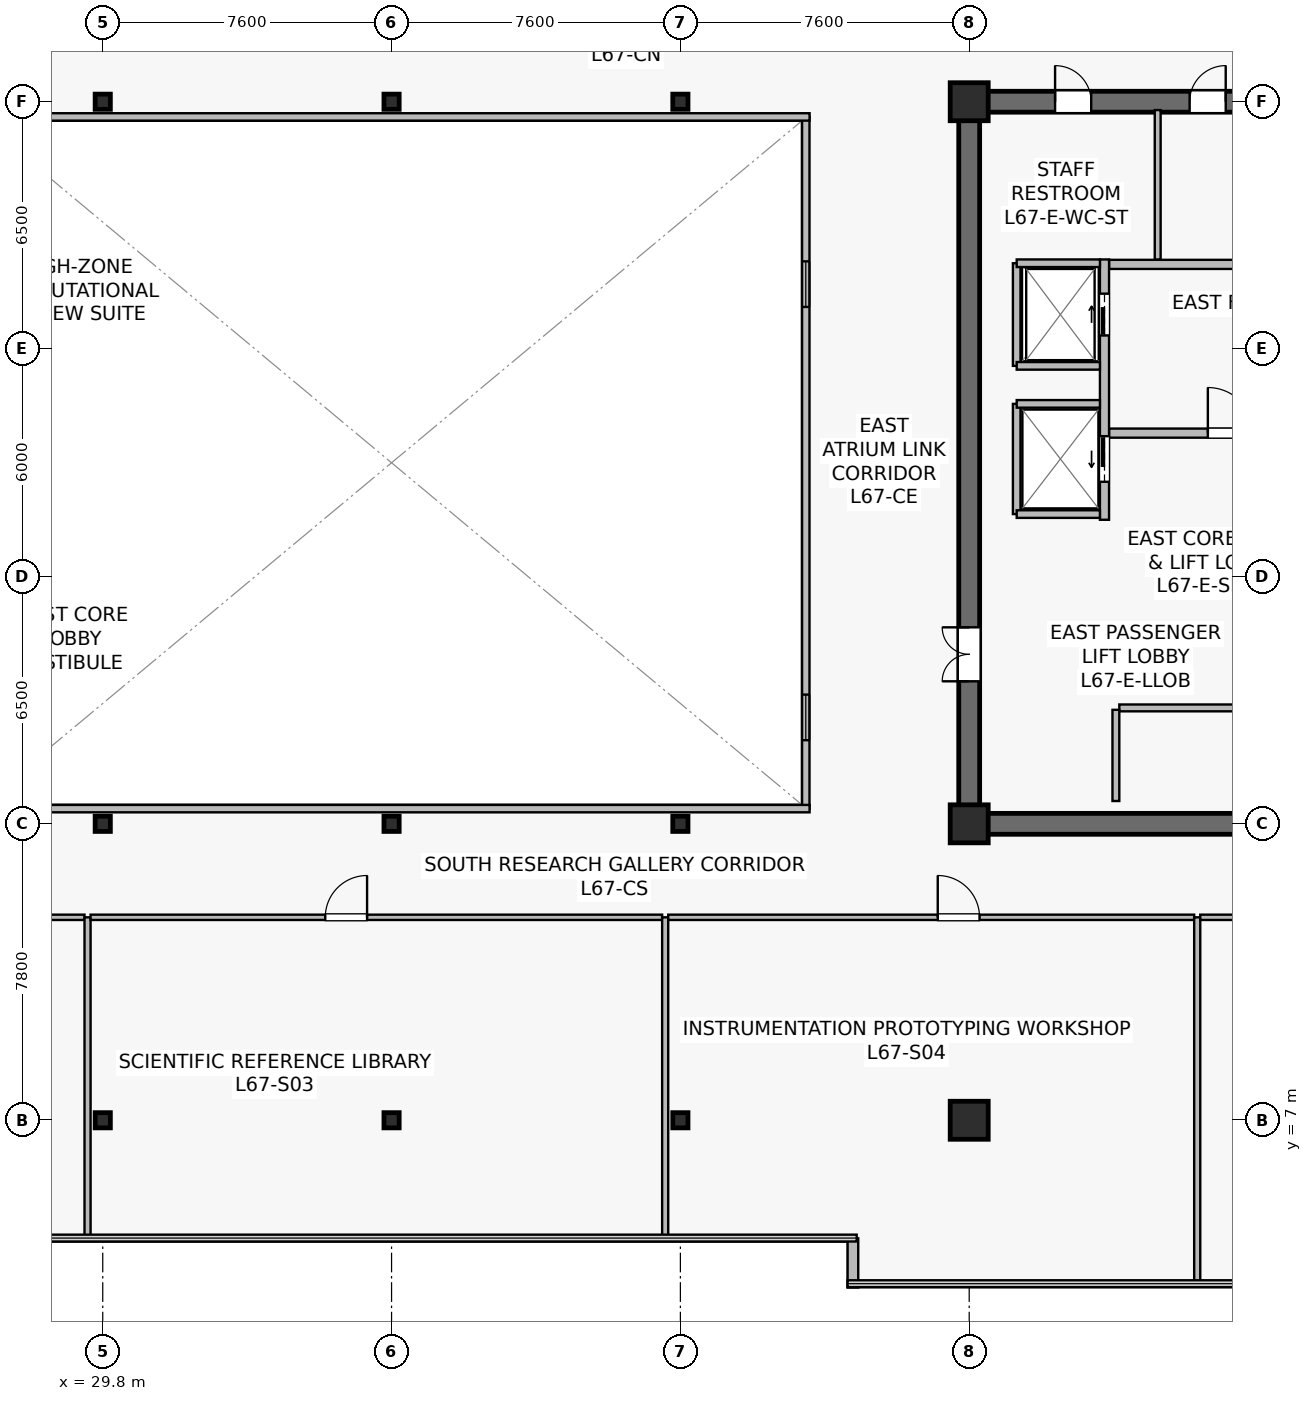
"""IFC4 building model, lengths in metres.
Left out: names, types, materials, properties, quantities, classifications, styles, units other than length and angle.
Written with IfcOpenShell. Run it as: python <this file> out.ifc"""

import sys

from ifc_helpers import new_model, si_unit, direction, frame, frame_2d, origin, origin_2d, place, context, subcontext, project, spatial, rectangle, hollow_rectangle, extrude, source, transform, mapped, element, fill, save


model = new_model("IFC4")
c1 = context("Model", 3, precision=1e-05, world=origin(), true_north=direction((0.0, 1.0)))
c2 = subcontext(c1, "Body", "Model", "MODEL_VIEW")
j1 = project(units=[si_unit("LENGTHUNIT", "METRE"), si_unit("PLANEANGLEUNIT", "RADIAN")], contexts=[c1])
p1 = place(None, origin())
s1 = spatial("IfcSite", under=j1, at=p1, CompositionType="ELEMENT")
p2 = place(p1, origin())
s2 = spatial("IfcBuilding", under=s1, at=p2, CompositionType="ELEMENT")
p3 = place(p2, frame((0.0, 0.0, 279.3)))
s3 = spatial("IfcBuildingStorey", under=s2, at=p3, CompositionType="ELEMENT", Elevation=279.3)
p4 = place(p3, frame((52.325, 14.8, 0.0), z_axis=(0.0, 0.0, 1.0), x_axis=(1.0, 0.0, 0.0)))
e1 = element("IfcWall", 1, at=p4, inside=s3, PredefinedType="SHEAR", context=c2, shape_type="SweptSolid", body=[
    extrude(rectangle(XDim=15.35, YDim=0.55, at=frame_2d((7.675, 0.0))), origin(), (0.0, 0.0, 1.0), 3.8),
])
p5 = place(p3, frame((52.325, 33.8, 0.0), z_axis=(0.0, 0.0, 1.0), x_axis=(1.0, 0.0, 0.0)))
e2 = element("IfcWall", 2, at=p5, inside=s3, PredefinedType="SHEAR", context=c2, shape_type="SweptSolid", body=[
    extrude(rectangle(XDim=15.35, YDim=0.55, at=frame_2d((7.675, 0.0))), origin(), (0.0, 0.0, 1.0), 3.8),
])
p6 = place(p5, frame((6.075, 0.0, 0.0)))
e3 = element("IfcOpeningElement", 3, at=p6, cuts=e2, PredefinedType="OPENING", context=c2, shape_type="SweptSolid", body=[
    extrude(rectangle(XDim=0.95, YDim=2.15, at=frame_2d((0.475, 1.075))), frame((0.0, 0.285, 0.0), z_axis=(0.0, -1.0, 0.0), x_axis=(1.0, 0.0, 0.0)), (0.0, 0.0, 1.0), 0.57),
])
p7 = place(p5, frame((2.535, 0.0, 0.0)))
e4 = element("IfcOpeningElement", 4, at=p7, cuts=e2, PredefinedType="OPENING", context=c2, shape_type="SweptSolid", body=[
    extrude(rectangle(XDim=0.95, YDim=2.15, at=frame_2d((0.475, 1.075))), frame((0.0, 0.285, 0.0), z_axis=(0.0, -1.0, 0.0), x_axis=(1.0, 0.0, 0.0)), (0.0, 0.0, 1.0), 0.57),
])
p8 = place(p3, frame((52.6, 15.075, 0.0), z_axis=(0.0, 0.0, 1.0), x_axis=(0.0, 1.0, 0.0)))
e5 = element("IfcWall", 5, at=p8, inside=s3, PredefinedType="SHEAR", context=c2, shape_type="SweptSolid", body=[
    extrude(rectangle(XDim=18.45, YDim=0.55, at=frame_2d((9.225, 0.0))), origin(), (0.0, 0.0, 1.0), 3.8),
])
p9 = place(p8, frame((3.475, 0.0, 0.0)))
e6 = element("IfcOpeningElement", 6, at=p9, cuts=e5, PredefinedType="OPENING", context=c2, shape_type="SweptSolid", body=[
    extrude(rectangle(XDim=1.42, YDim=2.2, at=frame_2d((0.71, 1.1))), frame((0.0, 0.285, 0.0), z_axis=(0.0, -1.0, 0.0), x_axis=(1.0, 0.0, 0.0)), (0.0, 0.0, 1.0), 0.57),
])
m1 = source(origin(), c2, "Body", "SweptSolid", [
    extrude(rectangle(XDim=1.0, YDim=1.0, at=origin_2d()), origin(), (0.0, 0.0, 1.0), 4.1),
])
for number, where, z_axis, x_axis in (
    (7, (52.6, 7.0, 0.0), (0.0, 0.0, 1.0), (1.0, 0.0, 0.0)),
    (8, (52.6, 14.8, 0.0), (0.0, 0.0, 1.0), (1.0, 0.0, 0.0)),
    (9, (52.6, 33.8, 0.0), (0.0, 0.0, 1.0), (1.0, 0.0, 0.0)),
):
    element("IfcColumn", number, at=place(p3, frame(where, z_axis=z_axis, x_axis=x_axis)), inside=s3, PredefinedType="COLUMN", context=c2, shape_type="MappedRepresentation", body=[
        mapped(m1, transform((0.0, 0.0, 0.0), scale=1.0)),
    ])
m2 = source(origin(), c2, "Body", "SweptSolid", [
    extrude(hollow_rectangle(XDim=0.4, YDim=0.4, WallThickness=0.019, at=origin_2d()), origin(), (0.0, 0.0, 1.0), 4.1),
])
for number, where, z_axis, x_axis in (
    (10, (29.8, 7.0, 0.0), (0.0, 0.0, 1.0), (1.0, 0.0, 0.0)),
    (11, (29.8, 14.8, 0.0), (0.0, 0.0, 1.0), (1.0, 0.0, 0.0)),
    (12, (29.8, 33.8, 0.0), (0.0, 0.0, 1.0), (1.0, 0.0, 0.0)),
    (13, (37.4, 7.0, 0.0), (0.0, 0.0, 1.0), (1.0, 0.0, 0.0)),
    (14, (37.4, 14.8, 0.0), (0.0, 0.0, 1.0), (1.0, 0.0, 0.0)),
    (15, (37.4, 33.8, 0.0), (0.0, 0.0, 1.0), (1.0, 0.0, 0.0)),
    (16, (45.0, 7.0, 0.0), (0.0, 0.0, 1.0), (1.0, 0.0, 0.0)),
    (17, (45.0, 14.8, 0.0), (0.0, 0.0, 1.0), (1.0, 0.0, 0.0)),
    (18, (45.0, 33.8, 0.0), (0.0, 0.0, 1.0), (1.0, 0.0, 0.0)),
):
    element("IfcColumn", number, at=place(p3, frame(where, z_axis=z_axis, x_axis=x_axis)), inside=s3, PredefinedType="COLUMN", context=c2, shape_type="MappedRepresentation", body=[
        mapped(m2, transform((0.0, 0.0, 0.0), scale=1.0)),
    ])
p10 = place(p3, frame((49.54, 3.893, 0.0), z_axis=(0.0, 0.0, 1.0), x_axis=(0.0, -1.0, 0.0)))
e19 = element("IfcWall", 19, at=p10, inside=s3, PredefinedType="STANDARD", context=c2, shape_type="SweptSolid", body=[
    extrude(rectangle(XDim=1.293, YDim=0.28, at=frame_2d((0.646, 0.0))), origin(), (0.0, 0.0, 1.0), 3.8),
])
p11 = place(p3, frame((56.28, 25.08, 0.0), z_axis=(0.0, 0.0, 1.0), x_axis=(1.0, 0.0, 0.0)))
e20 = element("IfcWall", 20, at=p11, inside=s3, PredefinedType="SOLIDWALL", context=c2, shape_type="SweptSolid", body=[
    extrude(rectangle(XDim=6.92, YDim=0.24, at=frame_2d((3.46, 0.0))), origin(), (0.0, 0.0, 1.0), 3.197),
])
p12 = place(p11, frame((2.6, 0.0, 0.0)))
e21 = element("IfcOpeningElement", 21, at=p12, cuts=e20, PredefinedType="OPENING", context=c2, shape_type="SweptSolid", body=[
    extrude(rectangle(XDim=1.2, YDim=2.16, at=frame_2d((0.6, 1.08))), frame((0.0, 0.13, 0.0), z_axis=(0.0, -1.0, 0.0), x_axis=(1.0, 0.0, 0.0)), (0.0, 0.0, 1.0), 0.26),
])
p13 = place(p3, frame((56.28, 29.52, 0.0), z_axis=(0.0, 0.0, 1.0), x_axis=(1.0, 0.0, 0.0)))
e22 = element("IfcWall", 22, at=p13, inside=s3, PredefinedType="SOLIDWALL", context=c2, shape_type="SweptSolid", body=[
    extrude(rectangle(XDim=6.92, YDim=0.24, at=frame_2d((3.46, 0.0))), origin(), (0.0, 0.0, 1.0), 3.197),
])
p14 = place(p3, frame((56.16, 22.8, 0.0), z_axis=(0.0, 0.0, 1.0), x_axis=(0.0, 1.0, 0.0)))
e23 = element("IfcWall", 23, at=p14, inside=s3, PredefinedType="SOLIDWALL", context=c2, shape_type="SweptSolid", body=[
    extrude(rectangle(XDim=6.85, YDim=0.24, at=frame_2d((3.425, 0.0))), origin(), (0.0, 0.0, 1.0), 2.935),
])
p15 = place(p14, frame((4.85, 0.0, 0.0)))
e24 = element("IfcOpeningElement", 24, at=p15, cuts=e23, PredefinedType="OPENING", context=c2, shape_type="SweptSolid", body=[
    extrude(rectangle(XDim=1.1, YDim=2.22, at=frame_2d((0.55, 1.11))), frame((0.0, 0.13, 0.0), z_axis=(0.0, -1.0, 0.0), x_axis=(1.0, 0.0, 0.0)), (0.0, 0.0, 1.0), 0.26),
])
p16 = place(p14, frame((1.0, 0.0, 0.0)))
e25 = element("IfcOpeningElement", 25, at=p16, cuts=e23, PredefinedType="OPENING", context=c2, shape_type="SweptSolid", body=[
    extrude(rectangle(XDim=1.2, YDim=2.22, at=frame_2d((0.6, 1.11))), frame((0.0, 0.13, 0.0), z_axis=(0.0, -1.0, 0.0), x_axis=(1.0, 0.0, 0.0)), (0.0, 0.0, 1.0), 0.26),
])
p17 = place(p3, frame((53.85, 26.85, 0.0), z_axis=(0.0, 0.0, 1.0), x_axis=(0.0, 1.0, 0.0)))
e26 = element("IfcWall", 26, at=p17, inside=s3, PredefinedType="SOLIDWALL", context=c2, shape_type="SweptSolid", body=[
    extrude(rectangle(XDim=2.7, YDim=0.2, at=frame_2d((1.35, 0.0))), origin(), (0.0, 0.0, 1.0), 3.8),
])
p18 = place(p3, frame((53.85, 29.55, 0.0), z_axis=(0.0, 0.0, 1.0), x_axis=(1.0, 0.0, 0.0)))
e27 = element("IfcWall", 27, at=p18, inside=s3, PredefinedType="SOLIDWALL", context=c2, shape_type="SweptSolid", body=[
    extrude(rectangle(XDim=2.19, YDim=0.2, at=frame_2d((1.095, 0.0))), origin(), (0.0, 0.0, 1.0), 3.8),
])
p19 = place(p3, frame((53.85, 26.85, 0.0), z_axis=(0.0, 0.0, 1.0), x_axis=(1.0, 0.0, 0.0)))
e28 = element("IfcWall", 28, at=p19, inside=s3, PredefinedType="SOLIDWALL", context=c2, shape_type="SweptSolid", body=[
    extrude(rectangle(XDim=2.19, YDim=0.2, at=frame_2d((1.095, 0.0))), origin(), (0.0, 0.0, 1.0), 3.197),
])
p20 = place(p3, frame((53.85, 22.95, 0.0), z_axis=(0.0, 0.0, 1.0), x_axis=(0.0, 1.0, 0.0)))
e29 = element("IfcWall", 29, at=p20, inside=s3, PredefinedType="SOLIDWALL", context=c2, shape_type="SweptSolid", body=[
    extrude(rectangle(XDim=2.9, YDim=0.2, at=frame_2d((1.45, 0.0))), origin(), (0.0, 0.0, 1.0), 2.935),
])
for number, where, z_axis, x_axis in (
    (30, (53.85, 25.85, 0.0), (0.0, 0.0, 1.0), (1.0, 0.0, 0.0)),
    (31, (53.85, 22.95, 0.0), (0.0, 0.0, 1.0), (1.0, 0.0, 0.0)),
):
    element("IfcWall", number, at=place(p3, frame(where, z_axis=z_axis, x_axis=x_axis)), inside=s3, PredefinedType="SOLIDWALL", context=c2, shape_type="SweptSolid", body=[
        extrude(rectangle(XDim=2.19, YDim=0.2, at=frame_2d((1.095, 0.0))), origin(), (0.0, 0.0, 1.0), 3.8),
    ])
p21 = place(p3, frame((56.55, 17.85, 0.0), z_axis=(0.0, 0.0, 1.0), x_axis=(1.0, 0.0, 0.0)))
e32 = element("IfcWall", 32, at=p21, inside=s3, PredefinedType="SOLIDWALL", context=c2, shape_type="SweptSolid", body=[
    extrude(rectangle(XDim=9.4, YDim=0.18, at=frame_2d((4.7, 0.0))), origin(), (0.0, 0.0, 1.0), 3.197),
])
p22 = place(p21, frame((4.225, 0.0, 0.0)))
e33 = element("IfcOpeningElement", 33, at=p22, cuts=e32, PredefinedType="OPENING", context=c2, shape_type="SweptSolid", body=[
    extrude(rectangle(XDim=0.95, YDim=2.15, at=frame_2d((0.475, 1.075))), frame((0.0, 0.1, 0.0), z_axis=(0.0, -1.0, 0.0), x_axis=(1.0, 0.0, 0.0)), (0.0, 0.0, 1.0), 0.2),
])
p23 = place(p3, frame((56.46, 15.4, 0.0), z_axis=(0.0, 0.0, 1.0), x_axis=(0.0, 1.0, 0.0)))
e34 = element("IfcWall", 34, at=p23, inside=s3, PredefinedType="SOLIDWALL", context=c2, shape_type="SweptSolid", body=[
    extrude(rectangle(XDim=2.4, YDim=0.18, at=frame_2d((1.2, 0.0))), origin(), (0.0, 0.0, 1.0), 3.8),
])
p24 = place(p3, frame((57.56, 29.65, 0.0), z_axis=(0.0, 0.0, 1.0), x_axis=(0.0, 1.0, 0.0)))
e35 = element("IfcWall", 35, at=p24, inside=s3, PredefinedType="PLUMBINGWALL", context=c2, shape_type="SweptSolid", body=[
    extrude(rectangle(XDim=3.93, YDim=0.155, at=frame_2d((1.965, 0.0))), origin(), (0.0, 0.0, 1.0), 3.8),
])
p25 = place(p3, frame((48.3, 15.2, 0.0), z_axis=(0.0, 0.0, 1.0), x_axis=(0.0, 1.0, 0.0)))
e36 = element("IfcWall", 36, at=p25, inside=s3, PredefinedType="SOLIDWALL", context=c2, shape_type="SweptSolid", body=[
    extrude(rectangle(XDim=18.2, YDim=0.195, at=frame_2d((9.1, 0.0))), origin(), (0.0, 0.0, 1.0), 3.8),
])
p26 = place(p25, frame((1.8, 0.0, 0.9)))
e37 = element("IfcOpeningElement", 37, at=p26, cuts=e36, PredefinedType="OPENING", context=c2, shape_type="SweptSolid", body=[
    extrude(rectangle(XDim=1.2, YDim=1.35, at=frame_2d((0.6, 0.675))), frame((0.0, 0.107, 0.0), z_axis=(0.0, -1.0, 0.0), x_axis=(1.0, 0.0, 0.0)), (0.0, 0.0, 1.0), 0.215),
])
p27 = place(p25, frame((13.2, 0.0, 0.9)))
e38 = element("IfcOpeningElement", 38, at=p27, cuts=e36, PredefinedType="OPENING", context=c2, shape_type="SweptSolid", body=[
    extrude(rectangle(XDim=1.2, YDim=1.35, at=frame_2d((0.6, 0.675))), frame((0.0, 0.107, 0.0), z_axis=(0.0, -1.0, 0.0), x_axis=(1.0, 0.0, 0.0)), (0.0, 0.0, 1.0), 0.215),
])
for number, where, z_axis, x_axis in (
    (39, (26.4, 15.2, 0.0), (0.0, 0.0, 1.0), (1.0, 0.0, 0.0)),
    (40, (26.4, 33.4, 0.0), (0.0, 0.0, 1.0), (1.0, 0.0, 0.0)),
):
    element("IfcWall", number, at=place(p3, frame(where, z_axis=z_axis, x_axis=x_axis)), inside=s3, PredefinedType="SOLIDWALL", context=c2, shape_type="SweptSolid", body=[
        extrude(rectangle(XDim=22.0, YDim=0.195, at=frame_2d((11.0, 0.0))), origin(), (0.0, 0.0, 1.0), 3.8),
    ])
p28 = place(p3, frame((15.88, 12.34, 0.0), z_axis=(0.0, 0.0, 1.0), x_axis=(1.0, 0.0, 0.0)))
e41 = element("IfcWall", 41, at=p28, inside=s3, PredefinedType="PARTITIONING", context=c2, shape_type="SweptSolid", body=[
    extrude(rectangle(XDim=13.44, YDim=0.14, at=frame_2d((6.72, 0.0))), origin(), (0.0, 0.0, 1.0), 3.197),
])
p29 = place(p28, frame((6.868, 0.0, 0.0)))
e42 = element("IfcOpeningElement", 42, at=p29, cuts=e41, PredefinedType="OPENING", context=c2, shape_type="SweptSolid", body=[
    extrude(rectangle(XDim=1.1, YDim=2.18, at=frame_2d((0.55, 1.09))), frame((0.0, 0.08, 0.0), z_axis=(0.0, -1.0, 0.0), x_axis=(1.0, 0.0, 0.0)), (0.0, 0.0, 1.0), 0.16),
])
p30 = place(p3, frame((29.4, 3.91, 0.0), z_axis=(0.0, 0.0, 1.0), x_axis=(0.0, 1.0, 0.0)))
e43 = element("IfcWall", 43, at=p30, inside=s3, PredefinedType="PARTITIONING", context=c2, shape_type="SweptSolid", body=[
    extrude(rectangle(XDim=8.43, YDim=0.16, at=frame_2d((4.215, 0.0))), origin(), (0.0, 0.0, 1.0), 3.135),
])
p31 = place(p3, frame((29.48, 12.34, 0.0), z_axis=(0.0, 0.0, 1.0), x_axis=(1.0, 0.0, 0.0)))
e44 = element("IfcWall", 44, at=p31, inside=s3, PredefinedType="PARTITIONING", context=c2, shape_type="SweptSolid", body=[
    extrude(rectangle(XDim=15.04, YDim=0.14, at=frame_2d((7.52, 0.0))), origin(), (0.0, 0.0, 1.0), 3.197),
])
p32 = place(p31, frame((6.176, 0.0, 0.0)))
e45 = element("IfcOpeningElement", 45, at=p32, cuts=e44, PredefinedType="OPENING", context=c2, shape_type="SweptSolid", body=[
    extrude(rectangle(XDim=1.1, YDim=2.18, at=frame_2d((0.55, 1.09))), frame((0.0, 0.08, 0.0), z_axis=(0.0, -1.0, 0.0), x_axis=(1.0, 0.0, 0.0)), (0.0, 0.0, 1.0), 0.16),
])
p33 = place(p3, frame((44.6, 3.91, 0.0), z_axis=(0.0, 0.0, 1.0), x_axis=(0.0, 1.0, 0.0)))
e46 = element("IfcWall", 46, at=p33, inside=s3, PredefinedType="PARTITIONING", context=c2, shape_type="SweptSolid", body=[
    extrude(rectangle(XDim=8.43, YDim=0.16, at=frame_2d((4.215, 0.0))), origin(), (0.0, 0.0, 1.0), 3.135),
])
p34 = place(p3, frame((44.68, 12.34, 0.0), z_axis=(0.0, 0.0, 1.0), x_axis=(1.0, 0.0, 0.0)))
e47 = element("IfcWall", 47, at=p34, inside=s3, PredefinedType="PARTITIONING", context=c2, shape_type="SweptSolid", body=[
    extrude(rectangle(XDim=13.84, YDim=0.14, at=frame_2d((6.92, 0.0))), origin(), (0.0, 0.0, 1.0), 3.197),
])
p35 = place(p34, frame((7.092, 0.0, 0.0)))
e48 = element("IfcOpeningElement", 48, at=p35, cuts=e47, PredefinedType="OPENING", context=c2, shape_type="SweptSolid", body=[
    extrude(rectangle(XDim=1.1, YDim=2.18, at=frame_2d((0.55, 1.09))), frame((0.0, 0.08, 0.0), z_axis=(0.0, -1.0, 0.0), x_axis=(1.0, 0.0, 0.0)), (0.0, 0.0, 1.0), 0.16),
])
p36 = place(p3, frame((58.6, 2.71, 0.0), z_axis=(0.0, 0.0, 1.0), x_axis=(0.0, 1.0, 0.0)))
e49 = element("IfcWall", 49, at=p36, inside=s3, PredefinedType="PARTITIONING", context=c2, shape_type="SweptSolid", body=[
    extrude(rectangle(XDim=9.63, YDim=0.16, at=frame_2d((4.815, 0.0))), origin(), (0.0, 0.0, 1.0), 3.135),
])
p37 = place(p3, frame((58.68, 12.34, 0.0), z_axis=(0.0, 0.0, 1.0), x_axis=(1.0, 0.0, 0.0)))
e50 = element("IfcWall", 50, at=p37, inside=s3, PredefinedType="PARTITIONING", context=c2, shape_type="SweptSolid", body=[
    extrude(rectangle(XDim=8.81, YDim=0.14, at=frame_2d((4.405, 0.0))), origin(), (0.0, 0.0, 1.0), 3.197),
])
p38 = place(p37, frame((3.434, 0.0, 0.0)))
e51 = element("IfcOpeningElement", 51, at=p38, cuts=e50, PredefinedType="OPENING", context=c2, shape_type="SweptSolid", body=[
    extrude(rectangle(XDim=1.1, YDim=2.18, at=frame_2d((0.55, 1.09))), frame((0.0, 0.08, 0.0), z_axis=(0.0, -1.0, 0.0), x_axis=(1.0, 0.0, 0.0)), (0.0, 0.0, 1.0), 0.16),
])
m3 = source(origin(), c2, "Body", "SweptSolid", [
    extrude(rectangle(XDim=1.2, YDim=1.35, at=frame_2d((0.6, 0.675))), frame((0.0, 0.03, 0.0), z_axis=(0.0, -1.0, 0.0), x_axis=(1.0, 0.0, 0.0)), (0.0, 0.0, 1.0), 0.06),
])
p39 = place(p26, origin())
e52 = element("IfcWindow", 52, at=p39, inside=s3, PartitioningType="SINGLE_PANEL", PredefinedType="WINDOW", context=c2, shape_type="MappedRepresentation", body=[
    mapped(m3, transform((0.0, 0.0, 0.0), scale=1.0)),
])
fill(e37, e52)
p40 = place(p27, origin())
e53 = element("IfcWindow", 53, at=p40, inside=s3, PartitioningType="SINGLE_PANEL", PredefinedType="WINDOW", context=c2, shape_type="MappedRepresentation", body=[
    mapped(m3, transform((0.0, 0.0, 0.0), scale=1.0)),
])
fill(e38, e53)
m4 = source(origin(), c2, "Body", "SweptSolid", [
    extrude(rectangle(XDim=1.2, YDim=2.16, at=frame_2d((0.6, 1.08))), frame((0.0, 0.025, 0.0), z_axis=(0.0, -1.0, 0.0), x_axis=(1.0, 0.0, 0.0)), (0.0, 0.0, 1.0), 0.05),
])
p41 = place(p12, origin())
e54 = element("IfcDoor", 54, at=p41, inside=s3, OperationType="SINGLE_SWING_LEFT", PredefinedType="DOOR", context=c2, shape_type="MappedRepresentation", body=[
    mapped(m4, transform((0.0, 0.0, 0.0), scale=1.0)),
])
fill(e21, e54)
m5 = source(origin(), c2, "Body", "SweptSolid", [
    extrude(rectangle(XDim=1.1, YDim=2.22, at=frame_2d((0.55, 1.11))), frame((0.0, 0.025, 0.0), z_axis=(0.0, -1.0, 0.0), x_axis=(1.0, 0.0, 0.0)), (0.0, 0.0, 1.0), 0.05),
])
p42 = place(p15, origin())
e55 = element("IfcDoor", 55, at=p42, inside=s3, OperationType="SLIDING_TO_RIGHT", PredefinedType="USERDEFINED", context=c2, shape_type="MappedRepresentation", body=[
    mapped(m5, transform((0.0, 0.0, 0.0), scale=1.0)),
])
fill(e24, e55)
m6 = source(origin(), c2, "Body", "SweptSolid", [
    extrude(rectangle(XDim=1.2, YDim=2.22, at=frame_2d((0.6, 1.11))), frame((0.0, 0.025, 0.0), z_axis=(0.0, -1.0, 0.0), x_axis=(1.0, 0.0, 0.0)), (0.0, 0.0, 1.0), 0.05),
])
p43 = place(p16, origin())
e56 = element("IfcDoor", 56, at=p43, inside=s3, OperationType="SLIDING_TO_LEFT", PredefinedType="USERDEFINED", context=c2, shape_type="MappedRepresentation", body=[
    mapped(m6, transform((0.0, 0.0, 0.0), scale=1.0)),
])
fill(e25, e56)
m7 = source(origin(), c2, "Body", "SweptSolid", [
    extrude(rectangle(XDim=1.42, YDim=2.2, at=frame_2d((0.71, 1.1))), frame((0.0, 0.025, 0.0), z_axis=(0.0, -1.0, 0.0), x_axis=(1.0, 0.0, 0.0)), (0.0, 0.0, 1.0), 0.05),
])
p44 = place(p9, origin())
e57 = element("IfcDoor", 57, at=p44, inside=s3, OperationType="DOUBLE_DOOR_SINGLE_SWING", PredefinedType="DOOR", context=c2, shape_type="MappedRepresentation", body=[
    mapped(m7, transform((0.0, 0.0, 0.0), scale=1.0)),
])
fill(e6, e57)
m8 = source(origin(), c2, "Body", "SweptSolid", [
    extrude(rectangle(XDim=0.95, YDim=2.15, at=frame_2d((0.475, 1.075))), frame((0.0, 0.025, 0.0), z_axis=(0.0, -1.0, 0.0), x_axis=(1.0, 0.0, 0.0)), (0.0, 0.0, 1.0), 0.05),
])
p45 = place(p6, origin())
e58 = element("IfcDoor", 58, at=p45, inside=s3, OperationType="SINGLE_SWING_RIGHT", PredefinedType="DOOR", context=c2, shape_type="MappedRepresentation", body=[
    mapped(m8, transform((0.0, 0.0, 0.0), scale=1.0)),
])
fill(e3, e58)
p46 = place(p7, origin())
e59 = element("IfcDoor", 59, at=p46, inside=s3, OperationType="SINGLE_SWING_LEFT", PredefinedType="DOOR", context=c2, shape_type="MappedRepresentation", body=[
    mapped(m8, transform((0.0, 0.0, 0.0), scale=1.0)),
])
fill(e4, e59)
m9 = source(origin(), c2, "Body", "SweptSolid", [
    extrude(rectangle(XDim=1.1, YDim=2.18, at=frame_2d((0.55, 1.09))), frame((0.0, 0.025, 0.0), z_axis=(0.0, -1.0, 0.0), x_axis=(1.0, 0.0, 0.0)), (0.0, 0.0, 1.0), 0.05),
])
p47 = place(p32, origin())
e60 = element("IfcDoor", 60, at=p47, inside=s3, OperationType="SINGLE_SWING_RIGHT", PredefinedType="DOOR", context=c2, shape_type="MappedRepresentation", body=[
    mapped(m9, transform((0.0, 0.0, 0.0), scale=1.0)),
])
fill(e45, e60)
p48 = place(p35, origin())
e61 = element("IfcDoor", 61, at=p48, inside=s3, OperationType="SINGLE_SWING_LEFT", PredefinedType="DOOR", context=c2, shape_type="MappedRepresentation", body=[
    mapped(m9, transform((0.0, 0.0, 0.0), scale=1.0)),
])
fill(e48, e61)
save(model, sys.argv[1])
